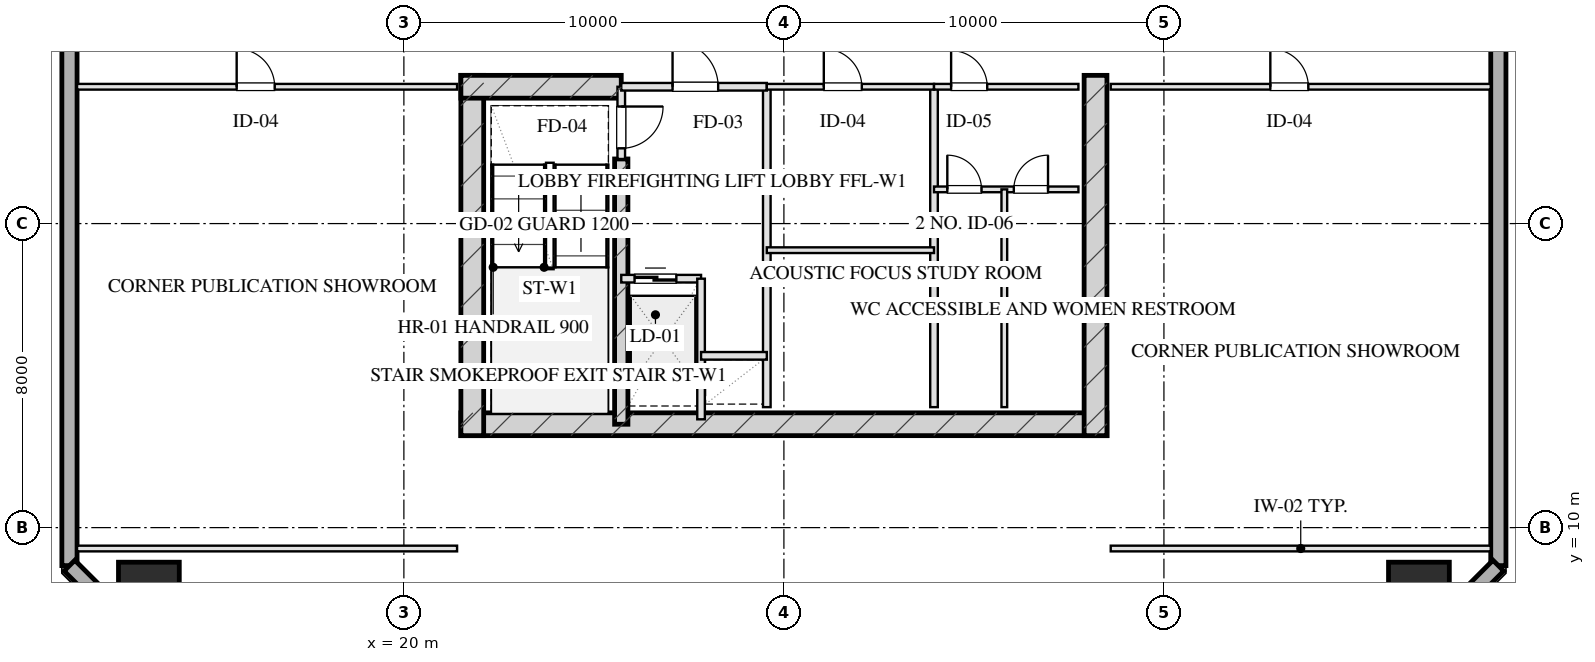
"""IFC4 building model, lengths in metres.
Left out: names, types, materials, properties, quantities, classifications, styles, units other than length and angle.
Written with IfcOpenShell. Run it as: python <this file> out.ifc"""

import sys

from ifc_helpers import new_model, si_unit, direction, frame, frame_2d, origin, origin_2d, place, context, subcontext, project, spatial, rectangle, hollow_rectangle, extrude, element, fill, save


model = new_model("IFC4")
c1 = context("Model", 3, precision=1e-05, world=origin(), true_north=direction((0.0, 1.0)))
c2 = subcontext(c1, "Body", "Model", "MODEL_VIEW")
j1 = project(units=[si_unit("LENGTHUNIT", "METRE"), si_unit("PLANEANGLEUNIT", "RADIAN")], contexts=[c1])
p1 = place(None, origin())
s1 = spatial("IfcSite", under=j1, at=p1, CompositionType="ELEMENT")
p2 = place(p1, origin())
s2 = spatial("IfcBuilding", under=s1, at=p2, CompositionType="ELEMENT")
p3 = place(p2, frame((0.0, 0.0, 124.2)))
s3 = spatial("IfcBuildingStorey", under=s2, at=p3, CompositionType="ELEMENT", Elevation=124.2)
p4 = place(p3, frame((21.5, 12.72, 0.0), z_axis=(0.0, 0.0, 1.0), x_axis=(1.0, 0.0, 0.0)))
e1 = element("IfcWall", 1, at=p4, inside=s3, PredefinedType="SHEAR", context=c2, shape_type="SweptSolid", body=[
    extrude(rectangle(XDim=17.0, YDim=0.6, at=frame_2d((8.5, 0.0))), origin(), (0.0, 0.0, 1.0), 3.45),
])
for number, where, z_axis, x_axis in (
    (2, (21.8, 21.9, 0.0), (0.0, 0.0, 1.0), (0.0, -1.0, 0.0)),
    (3, (38.2, 21.9, 0.0), (0.0, 0.0, 1.0), (0.0, -1.0, 0.0)),
):
    element("IfcWall", number, at=place(p3, frame(where, z_axis=z_axis, x_axis=x_axis)), inside=s3, PredefinedType="SHEAR", context=c2, shape_type="SweptSolid", body=[
        extrude(rectangle(XDim=9.48, YDim=0.6, at=frame_2d((4.74, 0.0))), origin(), (0.0, 0.0, 1.0), 3.45),
    ])
p5 = place(p3, frame((25.72, 19.7, 0.0), z_axis=(0.0, 0.0, 1.0), x_axis=(0.0, -1.0, 0.0)))
e4 = element("IfcWall", 4, at=p5, inside=s3, PredefinedType="SHEAR", context=c2, shape_type="SweptSolid", body=[
    extrude(rectangle(XDim=6.98, YDim=0.35, at=frame_2d((3.49, 0.0))), origin(), (0.0, 0.0, 1.0), 3.45),
])
p6 = place(p3, frame((21.5, 21.6, 0.0), z_axis=(0.0, 0.0, 1.0), x_axis=(1.0, 0.0, 0.0)))
e5 = element("IfcWall", 5, at=p6, inside=s3, PredefinedType="SHEAR", context=c2, shape_type="SweptSolid", body=[
    extrude(rectangle(XDim=4.22, YDim=0.6, at=frame_2d((2.11, 0.0))), origin(), (0.0, 0.0, 1.0), 3.45),
])
for number, where, z_axis, x_axis in (
    (6, (13.29, 8.29, 0.0), (0.0, 0.0, 1.0), (1.0, 0.0, 0.0)),
    (7, (46.71, 8.29, 0.0), (0.0, 0.0, 1.0), (1.0, 0.0, 0.0)),
):
    element("IfcColumn", number, at=place(p3, frame(where, z_axis=z_axis, x_axis=x_axis)), inside=s3, PredefinedType="COLUMN", context=c2, shape_type="SweptSolid", body=[
        extrude(hollow_rectangle(XDim=1.6, YDim=1.6, WallThickness=0.055, at=origin_2d()), origin(), (0.0, 0.0, 1.0), 3.451),
    ])
p7 = place(p3, frame((11.2, 9.0, 0.0), z_axis=(0.0, 0.0, 1.0), x_axis=(0.0, 1.0, 0.0)))
e8 = element("IfcWall", 8, at=p7, inside=s3, PredefinedType="SOLIDWALL", context=c2, shape_type="SweptSolid", body=[
    extrude(rectangle(XDim=50.0, YDim=0.4, at=frame_2d((25.0, 0.0))), origin(), (0.0, 0.0, 1.0), 2.61),
])
p8 = place(p7, frame((30.2, 0.0, 0.75)))
e9 = element("IfcOpeningElement", 9, at=p8, cuts=e8, PredefinedType="OPENING", context=c2, shape_type="SweptSolid", body=[
    extrude(rectangle(XDim=2.4, YDim=1.46, at=frame_2d((1.2, 0.73))), frame((0.0, 0.21, 0.0), z_axis=(0.0, -1.0, 0.0), x_axis=(1.0, 0.0, 0.0)), (0.0, 0.0, 1.0), 0.42),
])
p9 = place(p7, frame((18.65, 0.0, 0.0)))
e10 = element("IfcOpeningElement", 10, at=p9, cuts=e8, PredefinedType="OPENING", context=c2, shape_type="SweptSolid", body=[
    extrude(rectangle(XDim=1.1, YDim=2.15, at=frame_2d((0.55, 1.075))), frame((0.0, 0.21, 0.0), z_axis=(0.0, -1.0, 0.0), x_axis=(1.0, 0.0, 0.0)), (0.0, 0.0, 1.0), 0.42),
])
p10 = place(p3, frame((48.8, 59.0, 0.0), z_axis=(0.0, 0.0, 1.0), x_axis=(0.0, -1.0, 0.0)))
e11 = element("IfcWall", 11, at=p10, inside=s3, PredefinedType="SOLIDWALL", context=c2, shape_type="SweptSolid", body=[
    extrude(rectangle(XDim=50.0, YDim=0.4, at=frame_2d((25.0, 0.0))), origin(), (0.0, 0.0, 1.0), 2.61),
])
p11 = place(p10, frame((21.2, 0.0, 0.75)))
e12 = element("IfcOpeningElement", 12, at=p11, cuts=e11, PredefinedType="OPENING", context=c2, shape_type="SweptSolid", body=[
    extrude(rectangle(XDim=2.4, YDim=1.46, at=frame_2d((1.2, 0.73))), frame((0.0, 0.21, 0.0), z_axis=(0.0, -1.0, 0.0), x_axis=(1.0, 0.0, 0.0)), (0.0, 0.0, 1.0), 0.42),
])
p12 = place(p10, frame((30.25, 0.0, 0.0)))
e13 = element("IfcOpeningElement", 13, at=p12, cuts=e11, PredefinedType="OPENING", context=c2, shape_type="SweptSolid", body=[
    extrude(rectangle(XDim=1.1, YDim=2.15, at=frame_2d((0.55, 1.075))), frame((0.0, 0.21, 0.0), z_axis=(0.0, -1.0, 0.0), x_axis=(1.0, 0.0, 0.0)), (0.0, 0.0, 1.0), 0.42),
])
for number, where, z_axis, x_axis in (
    (14, (48.8, 9.0, 0.0), (0.0, 0.0, 1.0), (-0.707, -0.707, 0.0)),
    (15, (14.0, 6.2, 0.0), (0.0, 0.0, 1.0), (-0.707, 0.707, 0.0)),
):
    element("IfcWall", number, at=place(p3, frame(where, z_axis=z_axis, x_axis=x_axis)), inside=s3, PredefinedType="SOLIDWALL", context=c2, shape_type="SweptSolid", body=[
        extrude(rectangle(XDim=3.96, YDim=0.4, at=frame_2d((1.98, 0.0))), origin(), (0.0, 0.0, 1.0), 2.61),
    ])
p13 = place(p3, frame((25.72, 21.6, 0.0), z_axis=(0.0, 0.0, 1.0), x_axis=(0.0, -1.0, 0.0)))
e16 = element("IfcWall", 16, at=p13, inside=s3, PredefinedType="PARTITIONING", context=c2, shape_type="SweptSolid", body=[
    extrude(rectangle(XDim=1.9, YDim=0.2, at=frame_2d((0.95, 0.0))), origin(), (0.0, 0.0, 1.0), 3.175),
])
p14 = place(p13, frame((0.52, 0.0, 0.0)))
e17 = element("IfcOpeningElement", 17, at=p14, cuts=e16, PredefinedType="OPENING", context=c2, shape_type="SweptSolid", body=[
    extrude(rectangle(XDim=1.1, YDim=2.05, at=frame_2d((0.55, 1.025))), frame((0.0, 0.11, 0.0), z_axis=(0.0, -1.0, 0.0), x_axis=(1.0, 0.0, 0.0)), (0.0, 0.0, 1.0), 0.22),
])
p15 = place(p3, frame((29.55, 21.6, 0.0), z_axis=(0.0, 0.0, 1.0), x_axis=(0.0, -1.0, 0.0)))
e18 = element("IfcWall", 18, at=p15, inside=s3, PredefinedType="PARTITIONING", context=c2, shape_type="SweptSolid", body=[
    extrude(rectangle(XDim=8.43, YDim=0.2, at=frame_2d((4.215, 0.0))), origin(), (0.0, 0.0, 1.0), 3.175),
])
p16 = place(p3, frame((25.72, 21.6, 0.0), z_axis=(0.0, 0.0, 1.0), x_axis=(1.0, 0.0, 0.0)))
e19 = element("IfcWall", 19, at=p16, inside=s3, PredefinedType="PARTITIONING", context=c2, shape_type="SweptSolid", body=[
    extrude(rectangle(XDim=3.83, YDim=0.2, at=frame_2d((1.915, 0.0))), origin(), (0.0, 0.0, 1.0), 3.175),
])
p17 = place(p16, frame((1.35, 0.0, 0.0)))
e20 = element("IfcOpeningElement", 20, at=p17, cuts=e19, PredefinedType="OPENING", context=c2, shape_type="SweptSolid", body=[
    extrude(rectangle(XDim=1.2, YDim=2.05, at=frame_2d((0.6, 1.025))), frame((0.0, 0.11, 0.0), z_axis=(0.0, -1.0, 0.0), x_axis=(1.0, 0.0, 0.0)), (0.0, 0.0, 1.0), 0.22),
])
p18 = place(p3, frame((25.72, 16.55, 0.0), z_axis=(0.0, 0.0, 1.0), x_axis=(1.0, 0.0, 0.0)))
e21 = element("IfcWall", 21, at=p18, inside=s3, PredefinedType="PARTITIONING", context=c2, shape_type="SweptSolid", body=[
    extrude(rectangle(XDim=2.1, YDim=0.2, at=frame_2d((1.05, 0.0))), origin(), (0.0, 0.0, 1.0), 3.175),
])
p19 = place(p18, frame((0.35, 0.0, 0.0)))
e22 = element("IfcOpeningElement", 22, at=p19, cuts=e21, PredefinedType="OPENING", context=c2, shape_type="SweptSolid", body=[
    extrude(rectangle(XDim=1.1, YDim=2.05, at=frame_2d((0.55, 1.025))), frame((0.0, 0.11, 0.0), z_axis=(0.0, -1.0, 0.0), x_axis=(1.0, 0.0, 0.0)), (0.0, 0.0, 1.0), 0.22),
])
p20 = place(p3, frame((27.82, 16.55, 0.0), z_axis=(0.0, 0.0, 1.0), x_axis=(0.0, -1.0, 0.0)))
e23 = element("IfcWall", 23, at=p20, inside=s3, PredefinedType="PARTITIONING", context=c2, shape_type="SweptSolid", body=[
    extrude(rectangle(XDim=3.7, YDim=0.2, at=frame_2d((1.85, 0.0))), origin(), (0.0, 0.0, 1.0), 3.175),
])
p21 = place(p3, frame((27.82, 14.52, 0.0), z_axis=(0.0, 0.0, 1.0), x_axis=(1.0, 0.0, 0.0)))
e24 = element("IfcWall", 24, at=p21, inside=s3, PredefinedType="PARTITIONING", context=c2, shape_type="SweptSolid", body=[
    extrude(rectangle(XDim=1.73, YDim=0.2, at=frame_2d((0.865, 0.0))), origin(), (0.0, 0.0, 1.0), 3.175),
])
p22 = place(p3, frame((33.95, 21.6, 0.0), z_axis=(0.0, 0.0, 1.0), x_axis=(0.0, -1.0, 0.0)))
e25 = element("IfcWall", 25, at=p22, inside=s3, PredefinedType="PARTITIONING", context=c2, shape_type="SweptSolid", body=[
    extrude(rectangle(XDim=8.43, YDim=0.2, at=frame_2d((4.215, 0.0))), origin(), (0.0, 0.0, 1.0), 3.175),
])
p23 = place(p3, frame((29.55, 21.6, 0.0), z_axis=(0.0, 0.0, 1.0), x_axis=(1.0, 0.0, 0.0)))
e26 = element("IfcWall", 26, at=p23, inside=s3, PredefinedType="PARTITIONING", context=c2, shape_type="SweptSolid", body=[
    extrude(rectangle(XDim=4.4, YDim=0.15, at=frame_2d((2.2, 0.0))), origin(), (0.0, 0.0, 1.0), 3.175),
])
p24 = place(p23, frame((1.5, 0.0, 0.0)))
e27 = element("IfcOpeningElement", 27, at=p24, cuts=e26, PredefinedType="OPENING", context=c2, shape_type="SweptSolid", body=[
    extrude(rectangle(XDim=1.0, YDim=2.05, at=frame_2d((0.5, 1.025))), frame((0.0, 0.085, 0.0), z_axis=(0.0, -1.0, 0.0), x_axis=(1.0, 0.0, 0.0)), (0.0, 0.0, 1.0), 0.17),
])
p25 = place(p3, frame((29.55, 17.3, 0.0), z_axis=(0.0, 0.0, 1.0), x_axis=(1.0, 0.0, 0.0)))
e28 = element("IfcWall", 28, at=p25, inside=s3, PredefinedType="PARTITIONING", context=c2, shape_type="SweptSolid", body=[
    extrude(rectangle(XDim=4.4, YDim=0.15, at=frame_2d((2.2, 0.0))), origin(), (0.0, 0.0, 1.0), 3.175),
])
p26 = place(p3, frame((33.95, 21.6, 0.0), z_axis=(0.0, 0.0, 1.0), x_axis=(1.0, 0.0, 0.0)))
e29 = element("IfcWall", 29, at=p26, inside=s3, PredefinedType="PARTITIONING", context=c2, shape_type="SweptSolid", body=[
    extrude(rectangle(XDim=3.8, YDim=0.15, at=frame_2d((1.9, 0.0))), origin(), (0.0, 0.0, 1.0), 3.175),
])
p27 = place(p26, frame((0.45, 0.0, 0.0)))
e30 = element("IfcOpeningElement", 30, at=p27, cuts=e29, PredefinedType="OPENING", context=c2, shape_type="SweptSolid", body=[
    extrude(rectangle(XDim=0.95, YDim=2.05, at=frame_2d((0.475, 1.025))), frame((0.0, 0.085, 0.0), z_axis=(0.0, -1.0, 0.0), x_axis=(1.0, 0.0, 0.0)), (0.0, 0.0, 1.0), 0.17),
])
p28 = place(p3, frame((33.95, 18.9, 0.0), z_axis=(0.0, 0.0, 1.0), x_axis=(1.0, 0.0, 0.0)))
e31 = element("IfcWall", 31, at=p28, inside=s3, PredefinedType="PARTITIONING", context=c2, shape_type="SweptSolid", body=[
    extrude(rectangle(XDim=3.8, YDim=0.15, at=frame_2d((1.9, 0.0))), origin(), (0.0, 0.0, 1.0), 3.175),
])
p29 = place(p28, frame((0.35, 0.0, 0.0)))
e32 = element("IfcOpeningElement", 32, at=p29, cuts=e31, PredefinedType="OPENING", context=c2, shape_type="SweptSolid", body=[
    extrude(rectangle(XDim=0.9, YDim=2.05, at=frame_2d((0.45, 1.025))), frame((0.0, 0.085, 0.0), z_axis=(0.0, -1.0, 0.0), x_axis=(1.0, 0.0, 0.0)), (0.0, 0.0, 1.0), 0.17),
])
p30 = place(p28, frame((2.1, 0.0, 0.0)))
e33 = element("IfcOpeningElement", 33, at=p30, cuts=e31, PredefinedType="OPENING", context=c2, shape_type="SweptSolid", body=[
    extrude(rectangle(XDim=0.9, YDim=2.05, at=frame_2d((0.45, 1.025))), frame((0.0, 0.085, 0.0), z_axis=(0.0, -1.0, 0.0), x_axis=(1.0, 0.0, 0.0)), (0.0, 0.0, 1.0), 0.17),
])
p31 = place(p3, frame((35.8, 18.9, 0.0), z_axis=(0.0, 0.0, 1.0), x_axis=(0.0, -1.0, 0.0)))
e34 = element("IfcWall", 34, at=p31, inside=s3, PredefinedType="PARTITIONING", context=c2, shape_type="SweptSolid", body=[
    extrude(rectangle(XDim=5.73, YDim=0.15, at=frame_2d((2.865, 0.0))), origin(), (0.0, 0.0, 1.0), 3.175),
])
p32 = place(p3, frame((11.4, 9.45, 0.0), z_axis=(0.0, 0.0, 1.0), x_axis=(1.0, 0.0, 0.0)))
e35 = element("IfcWall", 35, at=p32, inside=s3, PredefinedType="PARTITIONING", context=c2, shape_type="SweptSolid", body=[
    extrude(rectangle(XDim=10.0, YDim=0.15, at=frame_2d((5.0, 0.0))), origin(), (0.0, 0.0, 1.0), 3.175),
])
p33 = place(p3, frame((11.4, 21.6, 0.0), z_axis=(0.0, 0.0, 1.0), x_axis=(1.0, 0.0, 0.0)))
e36 = element("IfcWall", 36, at=p33, inside=s3, PredefinedType="PARTITIONING", context=c2, shape_type="SweptSolid", body=[
    extrude(rectangle(XDim=10.0, YDim=0.15, at=frame_2d((5.0, 0.0))), origin(), (0.0, 0.0, 1.0), 3.175),
])
p34 = place(p33, frame((4.2, 0.0, 0.0)))
e37 = element("IfcOpeningElement", 37, at=p34, cuts=e36, PredefinedType="OPENING", context=c2, shape_type="SweptSolid", body=[
    extrude(rectangle(XDim=1.0, YDim=2.05, at=frame_2d((0.5, 1.025))), frame((0.0, 0.085, 0.0), z_axis=(0.0, -1.0, 0.0), x_axis=(1.0, 0.0, 0.0)), (0.0, 0.0, 1.0), 0.17),
])
p35 = place(p3, frame((38.6, 9.45, 0.0), z_axis=(0.0, 0.0, 1.0), x_axis=(1.0, 0.0, 0.0)))
e38 = element("IfcWall", 38, at=p35, inside=s3, PredefinedType="PARTITIONING", context=c2, shape_type="SweptSolid", body=[
    extrude(rectangle(XDim=10.0, YDim=0.15, at=frame_2d((5.0, 0.0))), origin(), (0.0, 0.0, 1.0), 3.175),
])
p36 = place(p3, frame((38.6, 21.6, 0.0), z_axis=(0.0, 0.0, 1.0), x_axis=(1.0, 0.0, 0.0)))
e39 = element("IfcWall", 39, at=p36, inside=s3, PredefinedType="PARTITIONING", context=c2, shape_type="SweptSolid", body=[
    extrude(rectangle(XDim=10.0, YDim=0.15, at=frame_2d((5.0, 0.0))), origin(), (0.0, 0.0, 1.0), 3.175),
])
p37 = place(p36, frame((4.2, 0.0, 0.0)))
e40 = element("IfcOpeningElement", 40, at=p37, cuts=e39, PredefinedType="OPENING", context=c2, shape_type="SweptSolid", body=[
    extrude(rectangle(XDim=1.0, YDim=2.05, at=frame_2d((0.5, 1.025))), frame((0.0, 0.085, 0.0), z_axis=(0.0, -1.0, 0.0), x_axis=(1.0, 0.0, 0.0)), (0.0, 0.0, 1.0), 0.17),
])
p38 = place(p14, origin())
e41 = element("IfcDoor", 41, at=p38, inside=s3, OperationType="SINGLE_SWING_LEFT", PredefinedType="DOOR", context=c2, shape_type="SweptSolid", body=[
    extrude(rectangle(XDim=1.1, YDim=2.05, at=frame_2d((0.55, 1.025))), frame((0.0, 0.025, 0.0), z_axis=(0.0, -1.0, 0.0), x_axis=(1.0, 0.0, 0.0)), (0.0, 0.0, 1.0), 0.05),
])
fill(e17, e41)
p39 = place(p17, origin())
e42 = element("IfcDoor", 42, at=p39, inside=s3, OperationType="SINGLE_SWING_LEFT", PredefinedType="DOOR", context=c2, shape_type="SweptSolid", body=[
    extrude(rectangle(XDim=1.2, YDim=2.05, at=frame_2d((0.6, 1.025))), frame((0.0, 0.025, 0.0), z_axis=(0.0, -1.0, 0.0), x_axis=(1.0, 0.0, 0.0)), (0.0, 0.0, 1.0), 0.05),
])
fill(e20, e42)
p40 = place(p19, origin())
e43 = element("IfcDoor", 43, at=p40, inside=s3, OperationType="DOUBLE_DOOR_SLIDING", PredefinedType="DOOR", context=c2, shape_type="SweptSolid", body=[
    extrude(rectangle(XDim=1.1, YDim=2.05, at=frame_2d((0.55, 1.025))), frame((0.0, 0.025, 0.0), z_axis=(0.0, -1.0, 0.0), x_axis=(1.0, 0.0, 0.0)), (0.0, 0.0, 1.0), 0.05),
])
fill(e22, e43)
p41 = place(p24, origin())
e44 = element("IfcDoor", 44, at=p41, inside=s3, OperationType="SINGLE_SWING_LEFT", PredefinedType="DOOR", context=c2, shape_type="SweptSolid", body=[
    extrude(rectangle(XDim=1.0, YDim=2.05, at=frame_2d((0.5, 1.025))), frame((0.0, 0.025, 0.0), z_axis=(0.0, -1.0, 0.0), x_axis=(1.0, 0.0, 0.0)), (0.0, 0.0, 1.0), 0.05),
])
fill(e27, e44)
p42 = place(p27, origin())
e45 = element("IfcDoor", 45, at=p42, inside=s3, OperationType="SINGLE_SWING_LEFT", PredefinedType="DOOR", context=c2, shape_type="SweptSolid", body=[
    extrude(rectangle(XDim=0.95, YDim=2.05, at=frame_2d((0.475, 1.025))), frame((0.0, 0.025, 0.0), z_axis=(0.0, -1.0, 0.0), x_axis=(1.0, 0.0, 0.0)), (0.0, 0.0, 1.0), 0.05),
])
fill(e30, e45)
p43 = place(p29, origin())
e46 = element("IfcDoor", 46, at=p43, inside=s3, OperationType="SINGLE_SWING_LEFT", PredefinedType="DOOR", context=c2, shape_type="SweptSolid", body=[
    extrude(rectangle(XDim=0.9, YDim=2.05, at=frame_2d((0.45, 1.025))), frame((0.0, 0.025, 0.0), z_axis=(0.0, -1.0, 0.0), x_axis=(1.0, 0.0, 0.0)), (0.0, 0.0, 1.0), 0.05),
])
fill(e32, e46)
p44 = place(p30, origin())
e47 = element("IfcDoor", 47, at=p44, inside=s3, OperationType="SINGLE_SWING_RIGHT", PredefinedType="DOOR", context=c2, shape_type="SweptSolid", body=[
    extrude(rectangle(XDim=0.9, YDim=2.05, at=frame_2d((0.45, 1.025))), frame((0.0, 0.025, 0.0), z_axis=(0.0, -1.0, 0.0), x_axis=(1.0, 0.0, 0.0)), (0.0, 0.0, 1.0), 0.05),
])
fill(e33, e47)
p45 = place(p34, origin())
e48 = element("IfcDoor", 48, at=p45, inside=s3, OperationType="SINGLE_SWING_LEFT", PredefinedType="DOOR", context=c2, shape_type="SweptSolid", body=[
    extrude(rectangle(XDim=1.0, YDim=2.05, at=frame_2d((0.5, 1.025))), frame((0.0, 0.025, 0.0), z_axis=(0.0, -1.0, 0.0), x_axis=(1.0, 0.0, 0.0)), (0.0, 0.0, 1.0), 0.05),
])
fill(e37, e48)
p46 = place(p37, origin())
e49 = element("IfcDoor", 49, at=p46, inside=s3, OperationType="SINGLE_SWING_LEFT", PredefinedType="DOOR", context=c2, shape_type="SweptSolid", body=[
    extrude(rectangle(XDim=1.0, YDim=2.05, at=frame_2d((0.5, 1.025))), frame((0.0, 0.025, 0.0), z_axis=(0.0, -1.0, 0.0), x_axis=(1.0, 0.0, 0.0)), (0.0, 0.0, 1.0), 0.05),
])
fill(e40, e49)
save(model, sys.argv[1])
